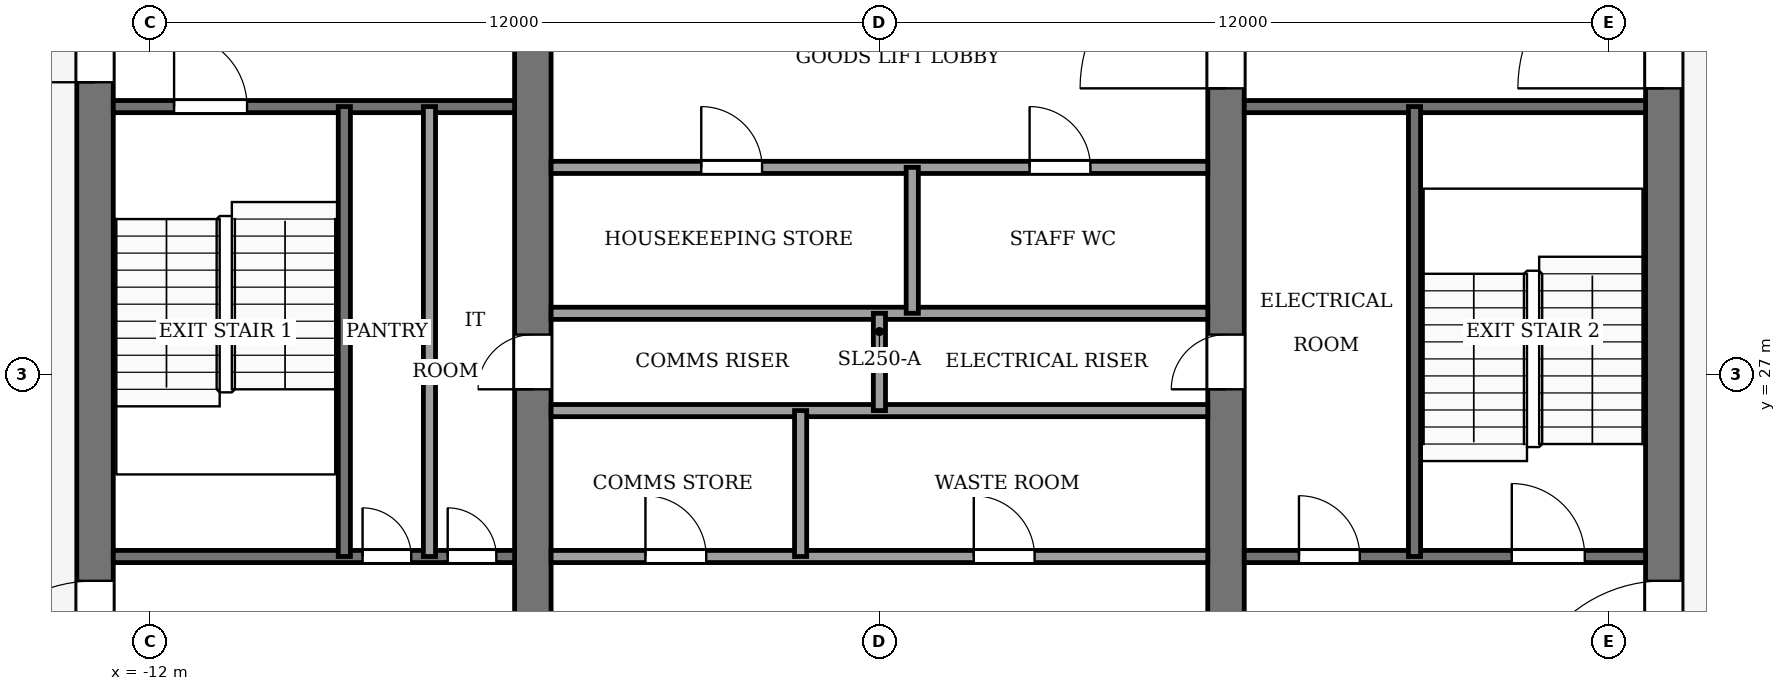
"""IFC4 building model, lengths in metres.
Left out: names, types, materials, properties, quantities, classifications, styles, units other than length and angle.
Written with IfcOpenShell. Run it as: python <this file> out.ifc"""

import sys

from ifc_helpers import new_model, si_unit, direction, frame, frame_2d, origin, place, context, subcontext, project, spatial, rectangle, extrude, element, fill, save


model = new_model("IFC4")
c1 = context("Model", 3, precision=1e-05, world=origin(), true_north=direction((0.0, 1.0)))
c2 = subcontext(c1, "Body", "Model", "MODEL_VIEW")
j1 = project(units=[si_unit("LENGTHUNIT", "METRE"), si_unit("PLANEANGLEUNIT", "RADIAN")], contexts=[c1])
p1 = place(None, origin())
s1 = spatial("IfcSite", under=j1, at=p1, CompositionType="ELEMENT")
p2 = place(p1, origin())
s2 = spatial("IfcBuilding", under=s1, at=p2, CompositionType="ELEMENT")
p3 = place(p2, frame((0.0, 0.0, 314.0)))
s3 = spatial("IfcBuildingStorey", under=s2, at=p3, CompositionType="ELEMENT", Elevation=314.0)
p4 = place(p3, frame((-12.9, 18.4, -0.13), z_axis=(0.0, 0.0, 1.0), x_axis=(0.0, 1.0, 0.0)))
e1 = element("IfcWall", 1, at=p4, inside=s3, PredefinedType="SHEAR", context=c2, shape_type="SweptSolid", body=[
    extrude(rectangle(XDim=19.2, YDim=0.6, at=frame_2d((9.6, 0.0))), origin(), (0.0, 0.0, 1.0), 4.0),
])
p5 = place(p4, frame((2.8, 0.0, 0.13)))
e2 = element("IfcOpeningElement", 2, at=p5, cuts=e1, PredefinedType="OPENING", context=c2, shape_type="SweptSolid", body=[
    extrude(rectangle(XDim=2.4, YDim=2.4, at=frame_2d((1.2, 1.2))), frame((0.0, 0.31, 0.0), z_axis=(0.0, -1.0, 0.0), x_axis=(1.0, 0.0, 0.0)), (0.0, 0.0, 1.0), 0.62),
])
p6 = place(p4, frame((13.4, 0.0, 0.13)))
e3 = element("IfcOpeningElement", 3, at=p6, cuts=e1, PredefinedType="OPENING", context=c2, shape_type="SweptSolid", body=[
    extrude(rectangle(XDim=1.4, YDim=2.2, at=frame_2d((0.7, 1.1))), frame((0.0, 0.31, 0.0), z_axis=(0.0, -1.0, 0.0), x_axis=(1.0, 0.0, 0.0)), (0.0, 0.0, 1.0), 0.62),
])
p7 = place(p3, frame((12.9, 18.4, -0.13), z_axis=(0.0, 0.0, 1.0), x_axis=(0.0, 1.0, 0.0)))
e4 = element("IfcWall", 4, at=p7, inside=s3, PredefinedType="SHEAR", context=c2, shape_type="SweptSolid", body=[
    extrude(rectangle(XDim=19.2, YDim=0.6, at=frame_2d((9.6, 0.0))), origin(), (0.0, 0.0, 1.0), 4.0),
])
p8 = place(p7, frame((2.8, 0.0, 0.13)))
e5 = element("IfcOpeningElement", 5, at=p8, cuts=e4, PredefinedType="OPENING", context=c2, shape_type="SweptSolid", body=[
    extrude(rectangle(XDim=2.4, YDim=2.4, at=frame_2d((1.2, 1.2))), frame((0.0, 0.31, 0.0), z_axis=(0.0, -1.0, 0.0), x_axis=(1.0, 0.0, 0.0)), (0.0, 0.0, 1.0), 0.62),
])
p9 = place(p7, frame((13.3, 0.0, 0.13)))
e6 = element("IfcOpeningElement", 6, at=p9, cuts=e4, PredefinedType="OPENING", context=c2, shape_type="SweptSolid", body=[
    extrude(rectangle(XDim=2.4, YDim=2.4, at=frame_2d((1.2, 1.2))), frame((0.0, 0.31, 0.0), z_axis=(0.0, -1.0, 0.0), x_axis=(1.0, 0.0, 0.0)), (0.0, 0.0, 1.0), 0.62),
])
p10 = place(p3, frame((-5.7, 18.4, -0.13), z_axis=(0.0, 0.0, 1.0), x_axis=(0.0, 1.0, 0.0)))
e7 = element("IfcWall", 7, at=p10, inside=s3, PredefinedType="SHEAR", context=c2, shape_type="SweptSolid", body=[
    extrude(rectangle(XDim=19.2, YDim=0.6, at=frame_2d((9.6, 0.0))), origin(), (0.0, 0.0, 1.0), 4.0),
])
p11 = place(p10, frame((8.35, 0.0, 0.13)))
e8 = element("IfcOpeningElement", 8, at=p11, cuts=e7, PredefinedType="OPENING", context=c2, shape_type="SweptSolid", body=[
    extrude(rectangle(XDim=0.9, YDim=2.1, at=frame_2d((0.45, 1.05))), frame((0.0, 0.31, 0.0), z_axis=(0.0, -1.0, 0.0), x_axis=(1.0, 0.0, 0.0)), (0.0, 0.0, 1.0), 0.62),
])
p12 = place(p3, frame((5.7, 18.4, -0.13), z_axis=(0.0, 0.0, 1.0), x_axis=(0.0, 1.0, 0.0)))
e9 = element("IfcWall", 9, at=p12, inside=s3, PredefinedType="SHEAR", context=c2, shape_type="SweptSolid", body=[
    extrude(rectangle(XDim=19.2, YDim=0.6, at=frame_2d((9.6, 0.0))), origin(), (0.0, 0.0, 1.0), 4.0),
])
p13 = place(p12, frame((8.35, 0.0, 0.13)))
e10 = element("IfcOpeningElement", 10, at=p13, cuts=e9, PredefinedType="OPENING", context=c2, shape_type="SweptSolid", body=[
    extrude(rectangle(XDim=0.9, YDim=2.1, at=frame_2d((0.45, 1.05))), frame((0.0, 0.31, 0.0), z_axis=(0.0, -1.0, 0.0), x_axis=(1.0, 0.0, 0.0)), (0.0, 0.0, 1.0), 0.62),
])
p14 = place(p12, frame((13.3, 0.0, 0.13)))
e11 = element("IfcOpeningElement", 11, at=p14, cuts=e9, PredefinedType="OPENING", context=c2, shape_type="SweptSolid", body=[
    extrude(rectangle(XDim=2.4, YDim=2.4, at=frame_2d((1.2, 1.2))), frame((0.0, 0.31, 0.0), z_axis=(0.0, -1.0, 0.0), x_axis=(1.0, 0.0, 0.0)), (0.0, 0.0, 1.0), 0.62),
])
p15 = place(p3, frame((-12.6, 24.0, 0.0), z_axis=(0.0, 0.0, 1.0), x_axis=(1.0, 0.0, 0.0)))
e12 = element("IfcWall", 12, at=p15, inside=s3, PredefinedType="PARTITIONING", context=c2, shape_type="SweptSolid", body=[
    extrude(rectangle(XDim=6.6, YDim=0.2, at=frame_2d((3.3, 0.0))), origin(), (0.0, 0.0, 1.0), 3.87),
])
p16 = place(p15, frame((4.1, 0.0, 0.0)))
e13 = element("IfcOpeningElement", 13, at=p16, cuts=e12, PredefinedType="OPENING", context=c2, shape_type="SweptSolid", body=[
    extrude(rectangle(XDim=0.8, YDim=2.1, at=frame_2d((0.4, 1.05))), frame((0.0, 0.11, 0.0), z_axis=(0.0, -1.0, 0.0), x_axis=(1.0, 0.0, 0.0)), (0.0, 0.0, 1.0), 0.22),
])
p17 = place(p15, frame((5.5, 0.0, 0.0)))
e14 = element("IfcOpeningElement", 14, at=p17, cuts=e12, PredefinedType="OPENING", context=c2, shape_type="SweptSolid", body=[
    extrude(rectangle(XDim=0.8, YDim=2.1, at=frame_2d((0.4, 1.05))), frame((0.0, 0.11, 0.0), z_axis=(0.0, -1.0, 0.0), x_axis=(1.0, 0.0, 0.0)), (0.0, 0.0, 1.0), 0.22),
])
p18 = place(p3, frame((-5.4, 24.0, 0.0), z_axis=(0.0, 0.0, 1.0), x_axis=(1.0, 0.0, 0.0)))
e15 = element("IfcWall", 15, at=p18, inside=s3, PredefinedType="PARTITIONING", context=c2, shape_type="SweptSolid", body=[
    extrude(rectangle(XDim=10.8, YDim=0.2, at=frame_2d((5.4, 0.0))), origin(), (0.0, 0.0, 1.0), 3.87),
])
p19 = place(p18, frame((1.552, 0.0, 0.0)))
e16 = element("IfcOpeningElement", 16, at=p19, cuts=e15, PredefinedType="OPENING", context=c2, shape_type="SweptSolid", body=[
    extrude(rectangle(XDim=1.0, YDim=2.1, at=frame_2d((0.5, 1.05))), frame((0.0, 0.11, 0.0), z_axis=(0.0, -1.0, 0.0), x_axis=(1.0, 0.0, 0.0)), (0.0, 0.0, 1.0), 0.22),
])
p20 = place(p18, frame((6.952, 0.0, 0.0)))
e17 = element("IfcOpeningElement", 17, at=p20, cuts=e15, PredefinedType="OPENING", context=c2, shape_type="SweptSolid", body=[
    extrude(rectangle(XDim=1.0, YDim=2.1, at=frame_2d((0.5, 1.05))), frame((0.0, 0.11, 0.0), z_axis=(0.0, -1.0, 0.0), x_axis=(1.0, 0.0, 0.0)), (0.0, 0.0, 1.0), 0.22),
])
p21 = place(p3, frame((6.0, 24.0, 0.0), z_axis=(0.0, 0.0, 1.0), x_axis=(1.0, 0.0, 0.0)))
e18 = element("IfcWall", 18, at=p21, inside=s3, PredefinedType="PARTITIONING", context=c2, shape_type="SweptSolid", body=[
    extrude(rectangle(XDim=6.6, YDim=0.2, at=frame_2d((3.3, 0.0))), origin(), (0.0, 0.0, 1.0), 3.87),
])
p22 = place(p21, frame((0.9, 0.0, 0.0)))
e19 = element("IfcOpeningElement", 19, at=p22, cuts=e18, PredefinedType="OPENING", context=c2, shape_type="SweptSolid", body=[
    extrude(rectangle(XDim=1.0, YDim=2.1, at=frame_2d((0.5, 1.05))), frame((0.0, 0.11, 0.0), z_axis=(0.0, -1.0, 0.0), x_axis=(1.0, 0.0, 0.0)), (0.0, 0.0, 1.0), 0.22),
])
p23 = place(p21, frame((4.4, 0.0, 0.0)))
e20 = element("IfcOpeningElement", 20, at=p23, cuts=e18, PredefinedType="OPENING", context=c2, shape_type="SweptSolid", body=[
    extrude(rectangle(XDim=1.2, YDim=2.2, at=frame_2d((0.6, 1.1))), frame((0.0, 0.11, 0.0), z_axis=(0.0, -1.0, 0.0), x_axis=(1.0, 0.0, 0.0)), (0.0, 0.0, 1.0), 0.22),
])
for number, where, z_axis, x_axis in (
    (21, (-5.4, 26.4, 0.0), (0.0, 0.0, 1.0), (1.0, 0.0, 0.0)),
    (22, (-5.4, 28.0, 0.0), (0.0, 0.0, 1.0), (1.0, 0.0, 0.0)),
):
    element("IfcWall", number, at=place(p3, frame(where, z_axis=z_axis, x_axis=x_axis)), inside=s3, PredefinedType="PARTITIONING", context=c2, shape_type="SweptSolid", body=[
        extrude(rectangle(XDim=10.8, YDim=0.2, at=frame_2d((5.4, 0.0))), origin(), (0.0, 0.0, 1.0), 3.87),
    ])
p24 = place(p3, frame((-5.4, 30.4, 0.0), z_axis=(0.0, 0.0, 1.0), x_axis=(1.0, 0.0, 0.0)))
e23 = element("IfcWall", 23, at=p24, inside=s3, PredefinedType="PARTITIONING", context=c2, shape_type="SweptSolid", body=[
    extrude(rectangle(XDim=10.8, YDim=0.2, at=frame_2d((5.4, 0.0))), origin(), (0.0, 0.0, 1.0), 3.87),
])
p25 = place(p24, frame((2.47, 0.0, 0.0)))
e24 = element("IfcOpeningElement", 24, at=p25, cuts=e23, PredefinedType="OPENING", context=c2, shape_type="SweptSolid", body=[
    extrude(rectangle(XDim=1.0, YDim=2.1, at=frame_2d((0.5, 1.05))), frame((0.0, 0.11, 0.0), z_axis=(0.0, -1.0, 0.0), x_axis=(1.0, 0.0, 0.0)), (0.0, 0.0, 1.0), 0.22),
])
p26 = place(p24, frame((7.87, 0.0, 0.0)))
e25 = element("IfcOpeningElement", 25, at=p26, cuts=e23, PredefinedType="OPENING", context=c2, shape_type="SweptSolid", body=[
    extrude(rectangle(XDim=1.0, YDim=2.1, at=frame_2d((0.5, 1.05))), frame((0.0, 0.11, 0.0), z_axis=(0.0, -1.0, 0.0), x_axis=(1.0, 0.0, 0.0)), (0.0, 0.0, 1.0), 0.22),
])
p27 = place(p3, frame((-12.6, 31.4, 0.0), z_axis=(0.0, 0.0, 1.0), x_axis=(1.0, 0.0, 0.0)))
e26 = element("IfcWall", 26, at=p27, inside=s3, PredefinedType="PARTITIONING", context=c2, shape_type="SweptSolid", body=[
    extrude(rectangle(XDim=6.6, YDim=0.2, at=frame_2d((3.3, 0.0))), origin(), (0.0, 0.0, 1.0), 3.87),
])
p28 = place(p27, frame((1.0, 0.0, 0.0)))
e27 = element("IfcOpeningElement", 27, at=p28, cuts=e26, PredefinedType="OPENING", context=c2, shape_type="SweptSolid", body=[
    extrude(rectangle(XDim=1.2, YDim=2.2, at=frame_2d((0.6, 1.1))), frame((0.0, 0.11, 0.0), z_axis=(0.0, -1.0, 0.0), x_axis=(1.0, 0.0, 0.0)), (0.0, 0.0, 1.0), 0.22),
])
p29 = place(p3, frame((6.0, 31.4, 0.0), z_axis=(0.0, 0.0, 1.0), x_axis=(1.0, 0.0, 0.0)))
e28 = element("IfcWall", 28, at=p29, inside=s3, PredefinedType="PARTITIONING", context=c2, shape_type="SweptSolid", body=[
    extrude(rectangle(XDim=6.6, YDim=0.2, at=frame_2d((3.3, 0.0))), origin(), (0.0, 0.0, 1.0), 3.87),
])
for number, where, z_axis, x_axis in (
    (29, (-8.8, 24.0, 0.0), (0.0, 0.0, 1.0), (0.0, 1.0, 0.0)),
    (30, (-7.4, 24.0, 0.0), (0.0, 0.0, 1.0), (0.0, 1.0, 0.0)),
):
    element("IfcWall", number, at=place(p3, frame(where, z_axis=z_axis, x_axis=x_axis)), inside=s3, PredefinedType="PARTITIONING", context=c2, shape_type="SweptSolid", body=[
        extrude(rectangle(XDim=7.4, YDim=0.2, at=frame_2d((3.7, 0.0))), origin(), (0.0, 0.0, 1.0), 3.87),
    ])
p30 = place(p3, frame((-1.296, 24.0, 0.0), z_axis=(0.0, 0.0, 1.0), x_axis=(0.0, 1.0, 0.0)))
e31 = element("IfcWall", 31, at=p30, inside=s3, PredefinedType="PARTITIONING", context=c2, shape_type="SweptSolid", body=[
    extrude(rectangle(XDim=2.4, YDim=0.2, at=frame_2d((1.2, 0.0))), origin(), (0.0, 0.0, 1.0), 3.87),
])
p31 = place(p3, frame((0.0, 26.4, 0.0), z_axis=(0.0, 0.0, 1.0), x_axis=(0.0, 1.0, 0.0)))
e32 = element("IfcWall", 32, at=p31, inside=s3, PredefinedType="PARTITIONING", context=c2, shape_type="SweptSolid", body=[
    extrude(rectangle(XDim=1.6, YDim=0.2, at=frame_2d((0.8, 0.0))), origin(), (0.0, 0.0, 1.0), 3.87),
])
p32 = place(p3, frame((0.54, 28.0, 0.0), z_axis=(0.0, 0.0, 1.0), x_axis=(0.0, 1.0, 0.0)))
e33 = element("IfcWall", 33, at=p32, inside=s3, PredefinedType="PARTITIONING", context=c2, shape_type="SweptSolid", body=[
    extrude(rectangle(XDim=2.4, YDim=0.2, at=frame_2d((1.2, 0.0))), origin(), (0.0, 0.0, 1.0), 3.87),
])
p33 = place(p3, frame((8.8, 24.0, 0.0), z_axis=(0.0, 0.0, 1.0), x_axis=(0.0, 1.0, 0.0)))
e34 = element("IfcWall", 34, at=p33, inside=s3, PredefinedType="PARTITIONING", context=c2, shape_type="SweptSolid", body=[
    extrude(rectangle(XDim=7.4, YDim=0.2, at=frame_2d((3.7, 0.0))), origin(), (0.0, 0.0, 1.0), 3.87),
])
p34 = place(p19, origin())
e35 = element("IfcDoor", 35, at=p34, inside=s3, OperationType="SINGLE_SWING_LEFT", PredefinedType="DOOR", context=c2, shape_type="SweptSolid", body=[
    extrude(rectangle(XDim=1.0, YDim=2.1, at=frame_2d((0.5, 1.05))), frame((0.0, 0.025, 0.0), z_axis=(0.0, -1.0, 0.0), x_axis=(1.0, 0.0, 0.0)), (0.0, 0.0, 1.0), 0.05),
])
fill(e16, e35)
p35 = place(p20, origin())
e36 = element("IfcDoor", 36, at=p35, inside=s3, OperationType="SINGLE_SWING_RIGHT", PredefinedType="DOOR", context=c2, shape_type="SweptSolid", body=[
    extrude(rectangle(XDim=1.0, YDim=2.1, at=frame_2d((0.5, 1.05))), frame((0.0, 0.025, 0.0), z_axis=(0.0, -1.0, 0.0), x_axis=(1.0, 0.0, 0.0)), (0.0, 0.0, 1.0), 0.05),
])
fill(e17, e36)
p36 = place(p25, origin())
e37 = element("IfcDoor", 37, at=p36, inside=s3, OperationType="SINGLE_SWING_RIGHT", PredefinedType="DOOR", context=c2, shape_type="SweptSolid", body=[
    extrude(rectangle(XDim=1.0, YDim=2.1, at=frame_2d((0.5, 1.05))), frame((0.0, 0.025, 0.0), z_axis=(0.0, -1.0, 0.0), x_axis=(1.0, 0.0, 0.0)), (0.0, 0.0, 1.0), 0.05),
])
fill(e24, e37)
p37 = place(p26, origin())
e38 = element("IfcDoor", 38, at=p37, inside=s3, OperationType="SINGLE_SWING_LEFT", PredefinedType="DOOR", context=c2, shape_type="SweptSolid", body=[
    extrude(rectangle(XDim=1.0, YDim=2.1, at=frame_2d((0.5, 1.05))), frame((0.0, 0.025, 0.0), z_axis=(0.0, -1.0, 0.0), x_axis=(1.0, 0.0, 0.0)), (0.0, 0.0, 1.0), 0.05),
])
fill(e25, e38)
p38 = place(p16, origin())
e39 = element("IfcDoor", 39, at=p38, inside=s3, OperationType="SINGLE_SWING_LEFT", PredefinedType="DOOR", context=c2, shape_type="SweptSolid", body=[
    extrude(rectangle(XDim=0.8, YDim=2.1, at=frame_2d((0.4, 1.05))), frame((0.0, 0.025, 0.0), z_axis=(0.0, -1.0, 0.0), x_axis=(1.0, 0.0, 0.0)), (0.0, 0.0, 1.0), 0.05),
])
fill(e13, e39)
p39 = place(p17, origin())
e40 = element("IfcDoor", 40, at=p39, inside=s3, OperationType="SINGLE_SWING_RIGHT", PredefinedType="DOOR", context=c2, shape_type="SweptSolid", body=[
    extrude(rectangle(XDim=0.8, YDim=2.1, at=frame_2d((0.4, 1.05))), frame((0.0, 0.025, 0.0), z_axis=(0.0, -1.0, 0.0), x_axis=(1.0, 0.0, 0.0)), (0.0, 0.0, 1.0), 0.05),
])
fill(e14, e40)
p40 = place(p22, origin())
e41 = element("IfcDoor", 41, at=p40, inside=s3, OperationType="SINGLE_SWING_RIGHT", PredefinedType="DOOR", context=c2, shape_type="SweptSolid", body=[
    extrude(rectangle(XDim=1.0, YDim=2.1, at=frame_2d((0.5, 1.05))), frame((0.0, 0.025, 0.0), z_axis=(0.0, -1.0, 0.0), x_axis=(1.0, 0.0, 0.0)), (0.0, 0.0, 1.0), 0.05),
])
fill(e19, e41)
p41 = place(p11, origin())
e42 = element("IfcDoor", 42, at=p41, inside=s3, OperationType="SINGLE_SWING_LEFT", PredefinedType="DOOR", context=c2, shape_type="SweptSolid", body=[
    extrude(rectangle(XDim=0.9, YDim=2.1, at=frame_2d((0.45, 1.05))), frame((0.0, 0.025, 0.0), z_axis=(0.0, -1.0, 0.0), x_axis=(1.0, 0.0, 0.0)), (0.0, 0.0, 1.0), 0.05),
])
fill(e8, e42)
p42 = place(p13, origin())
e43 = element("IfcDoor", 43, at=p42, inside=s3, OperationType="SINGLE_SWING_RIGHT", PredefinedType="DOOR", context=c2, shape_type="SweptSolid", body=[
    extrude(rectangle(XDim=0.9, YDim=2.1, at=frame_2d((0.45, 1.05))), frame((0.0, 0.025, 0.0), z_axis=(0.0, -1.0, 0.0), x_axis=(1.0, 0.0, 0.0)), (0.0, 0.0, 1.0), 0.05),
])
fill(e10, e43)
p43 = place(p28, origin())
e44 = element("IfcDoor", 44, at=p43, inside=s3, OperationType="SINGLE_SWING_RIGHT", PredefinedType="DOOR", context=c2, shape_type="SweptSolid", body=[
    extrude(rectangle(XDim=1.2, YDim=2.2, at=frame_2d((0.6, 1.1))), frame((0.0, 0.025, 0.0), z_axis=(0.0, -1.0, 0.0), x_axis=(1.0, 0.0, 0.0)), (0.0, 0.0, 1.0), 0.05),
])
fill(e27, e44)
p44 = place(p23, origin())
e45 = element("IfcDoor", 45, at=p44, inside=s3, OperationType="SINGLE_SWING_LEFT", PredefinedType="DOOR", context=c2, shape_type="SweptSolid", body=[
    extrude(rectangle(XDim=1.2, YDim=2.2, at=frame_2d((0.6, 1.1))), frame((0.0, 0.025, 0.0), z_axis=(0.0, -1.0, 0.0), x_axis=(1.0, 0.0, 0.0)), (0.0, 0.0, 1.0), 0.05),
])
fill(e20, e45)
p45 = place(p14, origin())
e46 = element("IfcDoor", 46, at=p45, inside=s3, OperationType="DOUBLE_DOOR_SINGLE_SWING", PredefinedType="DOOR", context=c2, shape_type="SweptSolid", body=[
    extrude(rectangle(XDim=2.4, YDim=2.4, at=frame_2d((1.2, 1.2))), frame((0.0, 0.025, 0.0), z_axis=(0.0, -1.0, 0.0), x_axis=(1.0, 0.0, 0.0)), (0.0, 0.0, 1.0), 0.05),
])
fill(e11, e46)
p46 = place(p5, origin())
e47 = element("IfcDoor", 47, at=p46, inside=s3, OperationType="DOUBLE_DOOR_SINGLE_SWING", PredefinedType="DOOR", context=c2, shape_type="SweptSolid", body=[
    extrude(rectangle(XDim=2.4, YDim=2.4, at=frame_2d((1.2, 1.2))), frame((0.0, 0.025, 0.0), z_axis=(0.0, -1.0, 0.0), x_axis=(1.0, 0.0, 0.0)), (0.0, 0.0, 1.0), 0.05),
])
fill(e2, e47)
p47 = place(p8, origin())
e48 = element("IfcDoor", 48, at=p47, inside=s3, OperationType="DOUBLE_DOOR_SINGLE_SWING", PredefinedType="DOOR", context=c2, shape_type="SweptSolid", body=[
    extrude(rectangle(XDim=2.4, YDim=2.4, at=frame_2d((1.2, 1.2))), frame((0.0, 0.025, 0.0), z_axis=(0.0, -1.0, 0.0), x_axis=(1.0, 0.0, 0.0)), (0.0, 0.0, 1.0), 0.05),
])
fill(e5, e48)
p48 = place(p9, origin())
e49 = element("IfcDoor", 49, at=p48, inside=s3, OperationType="DOUBLE_DOOR_SINGLE_SWING", PredefinedType="DOOR", context=c2, shape_type="SweptSolid", body=[
    extrude(rectangle(XDim=2.4, YDim=2.4, at=frame_2d((1.2, 1.2))), frame((0.0, 0.025, 0.0), z_axis=(0.0, -1.0, 0.0), x_axis=(1.0, 0.0, 0.0)), (0.0, 0.0, 1.0), 0.05),
])
fill(e6, e49)
p49 = place(p6, origin())
e50 = element("IfcDoor", 50, at=p49, inside=s3, OperationType="SINGLE_SWING_RIGHT", PredefinedType="DOOR", context=c2, shape_type="SweptSolid", body=[
    extrude(rectangle(XDim=1.4, YDim=2.2, at=frame_2d((0.7, 1.1))), frame((0.0, 0.025, 0.0), z_axis=(0.0, -1.0, 0.0), x_axis=(1.0, 0.0, 0.0)), (0.0, 0.0, 1.0), 0.05),
])
fill(e3, e50)
save(model, sys.argv[1])
